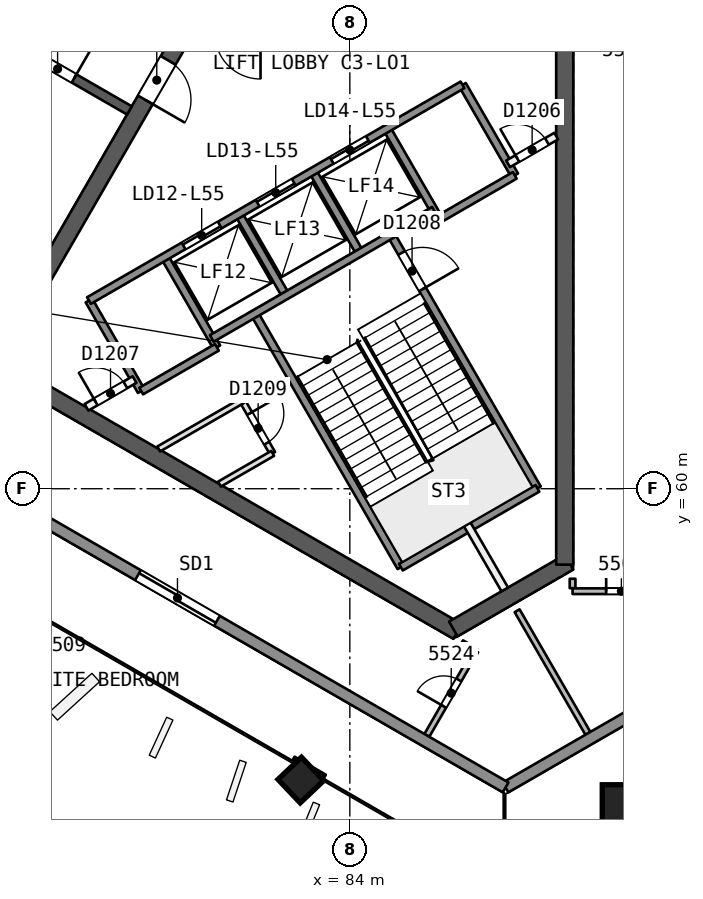
"""IFC4 building model, lengths in metres.
Left out: names, types, materials, properties, quantities, classifications, styles, units other than length and angle.
Written with IfcOpenShell. Run it as: python <this file> out.ifc"""

import sys

from ifc_helpers import new_model, si_unit, direction, frame, frame_2d, origin, origin_2d, place, context, subcontext, project, spatial, rectangle, extrude, element, fill, save


model = new_model("IFC4")
c1 = context("Model", 3, precision=1e-05, world=origin(), true_north=direction((0.0, 1.0)))
c2 = subcontext(c1, "Body", "Model", "MODEL_VIEW")
j1 = project(units=[si_unit("LENGTHUNIT", "METRE"), si_unit("PLANEANGLEUNIT", "RADIAN")], contexts=[c1])
p1 = place(None, origin())
s1 = spatial("IfcSite", under=j1, at=p1, CompositionType="ELEMENT")
p2 = place(p1, origin())
s2 = spatial("IfcBuilding", under=s1, at=p2, CompositionType="ELEMENT")
p3 = place(p2, frame((0.0, 0.0, 224.3)))
s3 = spatial("IfcBuildingStorey", under=s2, at=p3, CompositionType="ELEMENT", Elevation=224.3)
p4 = place(p3, frame((79.63, 71.981, 0.0), z_axis=(0.0, 0.0, 1.0), x_axis=(-0.500002171595, -0.86602415001, 0.0)))
e1 = element("IfcWall", 1, at=p4, inside=s3, PredefinedType="SHEAR", context=c2, shape_type="SweptSolid", body=[
    extrude(rectangle(XDim=10.25, YDim=0.45, at=frame_2d((5.125, 0.0))), origin(), (0.0, 0.0, 1.0), 3.7),
])
p5 = place(p4, frame((0.82, 0.0, 0.0)))
e2 = element("IfcOpeningElement", 2, at=p5, cuts=e1, PredefinedType="OPENING", context=c2, shape_type="SweptSolid", body=[
    extrude(rectangle(XDim=1.2, YDim=2.1, at=frame_2d((0.6, 1.05))), frame((0.0, 0.235, 0.0), z_axis=(0.0, -1.0, 0.0), x_axis=(1.0, 0.0, 0.0)), (0.0, 0.0, 1.0), 0.471),
])
p6 = place(p3, frame((74.617, 63.299, 0.0), z_axis=(0.0, 0.0, 1.0), x_axis=(0.86602594008, -0.499999071108, 0.0)))
e3 = element("IfcWall", 3, at=p6, inside=s3, PredefinedType="SHEAR", context=c2, shape_type="SweptSolid", body=[
    extrude(rectangle(XDim=14.108, YDim=0.45, at=frame_2d((7.054, 0.0))), origin(), (0.0, 0.0, 1.0), 3.7),
])
p7 = place(p3, frame((86.723, 56.31, 0.0), z_axis=(0.0, 0.0, 1.0), x_axis=(0.866042179588, 0.49997094233, 0.0)))
e4 = element("IfcWall", 4, at=p7, inside=s3, PredefinedType="SHEAR", context=c2, shape_type="SweptSolid", body=[
    extrude(rectangle(XDim=3.515, YDim=0.45, at=frame_2d((1.758, 0.0))), origin(), (0.0, 0.0, 1.0), 3.7),
])
p8 = place(p3, frame((89.655, 58.002, 0.0), z_axis=(0.0, 0.0, 1.0), x_axis=(0.0, 1.0, 0.0)))
e5 = element("IfcWall", 5, at=p8, inside=s3, PredefinedType="SHEAR", context=c2, shape_type="SweptSolid", body=[
    extrude(rectangle(XDim=14.204, YDim=0.45, at=frame_2d((7.102, 0.0))), origin(), (0.0, 0.0, 1.0), 3.7),
])
p9 = place(p3, frame((64.7, 77.748, 0.0), z_axis=(0.0, 0.0, 1.0), x_axis=(0.866026492143, -0.499998114903, 0.0)))
e6 = element("IfcWall", 6, at=p9, inside=s3, PredefinedType="SHEAR", context=c2, shape_type="SweptSolid", body=[
    extrude(rectangle(XDim=15.588, YDim=0.25, at=frame_2d((7.794, 0.0))), origin(), (0.0, 0.0, 1.0), 3.3),
])
p10 = place(p9, frame((2.462, 0.0, 0.0)))
e7 = element("IfcOpeningElement", 7, at=p10, cuts=e6, PredefinedType="OPENING", context=c2, shape_type="SweptSolid", body=[
    extrude(rectangle(XDim=1.0, YDim=2.1, at=frame_2d((0.5, 1.05))), frame((0.0, 0.135, 0.0), z_axis=(0.0, -1.0, 0.0), x_axis=(1.0, 0.0, 0.0)), (0.0, 0.0, 1.0), 0.271),
])
p11 = place(p9, frame((9.474, 0.0, 0.0)))
e8 = element("IfcOpeningElement", 8, at=p11, cuts=e6, PredefinedType="OPENING", context=c2, shape_type="SweptSolid", body=[
    extrude(rectangle(XDim=1.1, YDim=2.1, at=frame_2d((0.55, 1.05))), frame((0.0, 0.135, 0.0), z_axis=(0.0, -1.0, 0.0), x_axis=(1.0, 0.0, 0.0)), (0.0, 0.0, 1.0), 0.271),
])
p12 = place(p9, frame((12.906, 0.0, 0.0)))
e9 = element("IfcOpeningElement", 9, at=p12, cuts=e6, PredefinedType="OPENING", context=c2, shape_type="SweptSolid", body=[
    extrude(rectangle(XDim=1.0, YDim=2.1, at=frame_2d((0.5, 1.05))), frame((0.0, 0.135, 0.0), z_axis=(0.0, -1.0, 0.0), x_axis=(1.0, 0.0, 0.0)), (0.0, 0.0, 1.0), 0.271),
])
p13 = place(p3, frame((82.721, 52.301, 0.0), z_axis=(-0.008376454378, 0.028163354484, 0.999568237028), x_axis=(-0.500232049542, -0.86565577712, 0.020198320458)))
e10 = element("IfcColumn", 10, at=p13, inside=s3, PredefinedType="COLUMN", context=c2, shape_type="SweptSolid", body=[
    extrude(rectangle(XDim=0.85, YDim=0.85, at=origin_2d()), origin(), (0.0, 0.0, 1.0), 3.702),
])
p14 = place(p3, frame((91.613, 51.225, 0.0), z_axis=(-0.017541078386, 0.030532027415, 0.999379860649), x_axis=(0.497845433655, -0.866550650603, 0.035212130424)))
e11 = element("IfcColumn", 11, at=p14, inside=s3, PredefinedType="COLUMN", context=c2, shape_type="SweptSolid", body=[
    extrude(rectangle(XDim=1.9, YDim=1.9, at=origin_2d()), origin(), (0.0, 0.0, 1.0), 3.702),
])
p15 = place(p3, frame((89.861, 57.632, 0.0), z_axis=(0.0, 0.0, 1.0), x_axis=(0.0, -1.0, 0.0)))
e12 = element("IfcWall", 12, at=p15, inside=s3, PredefinedType="PARTITIONING", context=c2, shape_type="SweptSolid", body=[
    extrude(rectangle(XDim=0.248, YDim=0.15, at=frame_2d((0.124, 0.0))), origin(), (0.0, 0.0, 1.0), 3.3),
])
p16 = place(p3, frame((89.861, 57.304, 0.0), z_axis=(0.0, 0.0, 1.0), x_axis=(1.0, 0.0, 0.0)))
e13 = element("IfcWall", 13, at=p16, inside=s3, PredefinedType="PARTITIONING", context=c2, shape_type="SweptSolid", body=[
    extrude(rectangle(XDim=2.567, YDim=0.15, at=frame_2d((1.284, 0.0))), origin(), (0.0, 0.0, 1.0), 3.3),
])
p17 = place(p16, frame((0.884, 0.0, 0.0)))
e14 = element("IfcOpeningElement", 14, at=p17, cuts=e13, PredefinedType="OPENING", context=c2, shape_type="SweptSolid", body=[
    extrude(rectangle(XDim=0.8, YDim=2.1, at=frame_2d((0.4, 1.05))), frame((0.0, 0.085, 0.0), z_axis=(0.0, -1.0, 0.0), x_axis=(1.0, 0.0, 0.0)), (0.0, 0.0, 1.0), 0.171),
])
p18 = place(p3, frame((88.402, 56.789, 0.0), z_axis=(0.0, 0.0, 1.0), x_axis=(0.499966389646, -0.866044807862, 0.0)))
e15 = element("IfcWall", 15, at=p18, inside=s3, PredefinedType="PARTITIONING", context=c2, shape_type="SweptSolid", body=[
    extrude(rectangle(XDim=3.725, YDim=0.15, at=frame_2d((1.863, 0.0))), origin(), (0.0, 0.0, 1.0), 3.3),
])
p19 = place(p3, frame((86.026, 53.51, 0.0), z_axis=(0.0, 0.0, 1.0), x_axis=(0.50000507078, 0.866022476149, 0.0)))
e16 = element("IfcWall", 16, at=p19, inside=s3, PredefinedType="PARTITIONING", context=c2, shape_type="SweptSolid", body=[
    extrude(rectangle(XDim=2.567, YDim=0.15, at=frame_2d((1.284, 0.0))), origin(), (0.0, 0.0, 1.0), 3.3),
])
p20 = place(p19, frame((0.884, 0.0, 0.0)))
e17 = element("IfcOpeningElement", 17, at=p20, cuts=e16, PredefinedType="OPENING", context=c2, shape_type="SweptSolid", body=[
    extrude(rectangle(XDim=0.8, YDim=2.1, at=frame_2d((0.4, 1.05))), frame((0.0, 0.085, 0.0), z_axis=(0.0, -1.0, 0.0), x_axis=(1.0, 0.0, 0.0)), (0.0, 0.0, 1.0), 0.171),
])
p21 = place(p3, frame((87.31, 55.733, 0.0), z_axis=(0.0, 0.0, 1.0), x_axis=(-0.8659754619, 0.500086491905, 0.0)))
e18 = element("IfcWall", 18, at=p21, inside=s3, PredefinedType="PARTITIONING", context=c2, shape_type="SweptSolid", body=[
    extrude(rectangle(XDim=0.426, YDim=0.15, at=frame_2d((0.213, 0.0))), origin(), (0.0, 0.0, 1.0), 3.3),
])
p22 = place(p3, frame((92.577, 54.726, 0.0), z_axis=(0.0, 0.0, 1.0), x_axis=(-0.866032272612, -0.499988102653, 0.0)))
e19 = element("IfcWall", 19, at=p22, inside=s3, PredefinedType="SOLIDWALL", context=c2, shape_type="SweptSolid", body=[
    extrude(rectangle(XDim=5.171, YDim=0.3, at=frame_2d((2.585, 0.0))), origin(), (0.0, 0.0, 1.0), 3.3),
])
p23 = place(p3, frame((88.099, 52.141, 0.0), z_axis=(0.0, 0.0, 1.0), x_axis=(-0.86602584856, 0.499999229625, 0.0)))
e20 = element("IfcWall", 20, at=p23, inside=s3, PredefinedType="SOLIDWALL", context=c2, shape_type="SweptSolid", body=[
    extrude(rectangle(XDim=50.547, YDim=0.3, at=frame_2d((25.274, 0.0))), origin(), (0.0, 0.0, 1.0), 3.3),
])
p24 = place(p23, frame((23.294, 0.0, 0.0)))
e21 = element("IfcOpeningElement", 21, at=p24, cuts=e20, PredefinedType="OPENING", context=c2, shape_type="SweptSolid", body=[
    extrude(rectangle(XDim=2.4, YDim=2.4, at=frame_2d((1.2, 1.2))), frame((0.0, 0.161, 0.0), z_axis=(0.0, -1.0, 0.0), x_axis=(1.0, 0.0, 0.0)), (0.0, 0.0, 1.0), 0.321),
])
p25 = place(p23, frame((28.906, 0.0, 0.0)))
e22 = element("IfcOpeningElement", 22, at=p25, cuts=e20, PredefinedType="OPENING", context=c2, shape_type="SweptSolid", body=[
    extrude(rectangle(XDim=2.4, YDim=2.4, at=frame_2d((1.2, 1.2))), frame((0.0, 0.161, 0.0), z_axis=(0.0, -1.0, 0.0), x_axis=(1.0, 0.0, 0.0)), (0.0, 0.0, 1.0), 0.321),
])
p26 = place(p23, frame((39.328, 0.0, 0.0)))
e23 = element("IfcOpeningElement", 23, at=p26, cuts=e20, PredefinedType="OPENING", context=c2, shape_type="SweptSolid", body=[
    extrude(rectangle(XDim=2.4, YDim=2.4, at=frame_2d((1.2, 1.2))), frame((0.0, 0.161, 0.0), z_axis=(0.0, -1.0, 0.0), x_axis=(1.0, 0.0, 0.0)), (0.0, 0.0, 1.0), 0.321),
])
p27 = place(p23, frame((18.462, 0.0, 0.0)))
e24 = element("IfcOpeningElement", 24, at=p27, cuts=e20, PredefinedType="OPENING", context=c2, shape_type="SweptSolid", body=[
    extrude(rectangle(XDim=2.4, YDim=2.4, at=frame_2d((1.2, 1.2))), frame((0.0, 0.161, 0.0), z_axis=(0.0, -1.0, 0.0), x_axis=(1.0, 0.0, 0.0)), (0.0, 0.0, 1.0), 0.321),
])
p28 = place(p23, frame((8.771, 0.0, 0.0)))
e25 = element("IfcOpeningElement", 25, at=p28, cuts=e20, PredefinedType="OPENING", context=c2, shape_type="SweptSolid", body=[
    extrude(rectangle(XDim=2.4, YDim=2.4, at=frame_2d((1.2, 1.2))), frame((0.0, 0.161, 0.0), z_axis=(0.0, -1.0, 0.0), x_axis=(1.0, 0.0, 0.0)), (0.0, 0.0, 1.0), 0.321),
])
p29 = place(p3, frame((77.135, 64.952, 0.0), z_axis=(0.0, 0.0, 1.0), x_axis=(0.499996545922, -0.866027397988, 0.0)))
e26 = element("IfcWall", 26, at=p29, inside=s3, PredefinedType="SOLIDWALL", context=c2, shape_type="SweptSolid", body=[
    extrude(rectangle(XDim=2.75, YDim=0.2, at=frame_2d((1.375, 0.0))), origin(), (0.0, 0.0, 1.0), 3.3),
])
p30 = place(p3, frame((81.169, 62.315, 0.0), z_axis=(0.0, 0.0, 1.0), x_axis=(0.499995408039, -0.866028054938, 0.0)))
e27 = element("IfcWall", 27, at=p30, inside=s3, PredefinedType="PARTITIONING", context=c2, shape_type="SweptSolid", body=[
    extrude(rectangle(XDim=1.6, YDim=0.15, at=frame_2d((0.8, 0.0))), origin(), (0.0, 0.0, 1.0), 3.3),
])
p31 = place(p30, frame((0.387, 0.0, 0.0)))
e28 = element("IfcOpeningElement", 28, at=p31, cuts=e27, PredefinedType="OPENING", context=c2, shape_type="SweptSolid", body=[
    extrude(rectangle(XDim=0.9, YDim=2.1, at=frame_2d((0.45, 1.05))), frame((0.0, 0.085, 0.0), z_axis=(0.0, -1.0, 0.0), x_axis=(1.0, 0.0, 0.0)), (0.0, 0.0, 1.0), 0.171),
])
p32 = place(p3, frame((79.127, 66.102, 0.0), z_axis=(0.0, 0.0, 1.0), x_axis=(0.499996545922, -0.866027397988, 0.0)))
e29 = element("IfcWall", 29, at=p32, inside=s3, PredefinedType="SOLIDWALL", context=c2, shape_type="SweptSolid", body=[
    extrude(rectangle(XDim=2.75, YDim=0.2, at=frame_2d((1.375, 0.0))), origin(), (0.0, 0.0, 1.0), 3.3),
])
p33 = place(p3, frame((81.493, 64.604, 0.0), z_axis=(0.0, 0.0, 1.0), x_axis=(0.500006057782, -0.866021906294, 0.0)))
e30 = element("IfcWall", 30, at=p33, inside=s3, PredefinedType="SOLIDWALL", context=c2, shape_type="SweptSolid", body=[
    extrude(rectangle(XDim=7.7, YDim=0.2, at=frame_2d((3.85, 0.0))), origin(), (0.0, 0.0, 1.0), 3.3),
])
p34 = place(p3, frame((81.076, 67.227, 0.0), z_axis=(0.0, 0.0, 1.0), x_axis=(0.50000366821, -0.866023285932, 0.0)))
e31 = element("IfcWall", 31, at=p34, inside=s3, PredefinedType="SOLIDWALL", context=c2, shape_type="SweptSolid", body=[
    extrude(rectangle(XDim=2.48, YDim=0.2, at=frame_2d((1.24, 0.0))), origin(), (0.0, 0.0, 1.0), 3.3),
])
p35 = place(p3, frame((87.09, 59.06, 0.0), z_axis=(0.0, 0.0, 1.0), x_axis=(0.500011643316, -0.866018681408, 0.0)))
e32 = element("IfcWall", 32, at=p35, inside=s3, PredefinedType="PARTITIONING", context=c2, shape_type="SweptSolid", body=[
    extrude(rectangle(XDim=1.973, YDim=0.2, at=frame_2d((0.987, 0.0))), origin(), (0.0, 0.0, 1.0), 3.3),
])
p36 = place(p3, frame((83.024, 68.352, 0.0), z_axis=(0.0, 0.0, 1.0), x_axis=(0.50000366821, -0.866023285932, 0.0)))
e33 = element("IfcWall", 33, at=p36, inside=s3, PredefinedType="SOLIDWALL", context=c2, shape_type="SweptSolid", body=[
    extrude(rectangle(XDim=2.48, YDim=0.2, at=frame_2d((1.24, 0.0))), origin(), (0.0, 0.0, 1.0), 3.3),
])
p37 = place(p3, frame((85.087, 66.679, 0.0), z_axis=(0.0, 0.0, 1.0), x_axis=(0.500019787375, -0.866013979237, 0.0)))
e34 = element("IfcWall", 34, at=p37, inside=s3, PredefinedType="SOLIDWALL", context=c2, shape_type="SweptSolid", body=[
    extrude(rectangle(XDim=7.7, YDim=0.2, at=frame_2d((3.85, 0.0))), origin(), (0.0, 0.0, 1.0), 3.3),
])
p38 = place(p37, frame((0.55, 0.0, 0.0)))
e35 = element("IfcOpeningElement", 35, at=p38, cuts=e34, PredefinedType="OPENING", context=c2, shape_type="SweptSolid", body=[
    extrude(rectangle(XDim=1.1, YDim=2.1, at=frame_2d((0.55, 1.05))), frame((0.0, 0.11, 0.0), z_axis=(0.0, -1.0, 0.0), x_axis=(1.0, 0.0, 0.0)), (0.0, 0.0, 1.0), 0.221),
])
for number, where, z_axis, x_axis in (
    (36, (84.973, 69.477, 0.0), (0.0, 0.0, 1.0), (0.5, -0.866, 0.0)),
    (37, (86.965, 70.626, 0.0), (0.0, 0.0, 1.0), (0.5, -0.866, 0.0)),
):
    element("IfcWall", number, at=place(p3, frame(where, z_axis=z_axis, x_axis=x_axis)), inside=s3, PredefinedType="SOLIDWALL", context=c2, shape_type="SweptSolid", body=[
        extrude(rectangle(XDim=2.75, YDim=0.2, at=frame_2d((1.375, 0.0))), origin(), (0.0, 0.0, 1.0), 3.3),
    ])
p39 = place(p3, frame((77.135, 64.952, 0.0), z_axis=(0.0, 0.0, 1.0), x_axis=(0.866031916153, 0.499988720078, 0.0)))
e38 = element("IfcWall", 38, at=p39, inside=s3, PredefinedType="SOLIDWALL", context=c2, shape_type="SweptSolid", body=[
    extrude(rectangle(XDim=11.35, YDim=0.2, at=frame_2d((5.675, 0.0))), origin(), (0.0, 0.0, 1.0), 3.3),
])
p40 = place(p39, frame((2.875, 0.0, 0.0)))
e39 = element("IfcOpeningElement", 39, at=p40, cuts=e38, PredefinedType="OPENING", context=c2, shape_type="SweptSolid", body=[
    extrude(rectangle(XDim=1.1, YDim=2.1, at=frame_2d((0.55, 1.05))), frame((0.0, 0.11, 0.0), z_axis=(0.0, -1.0, 0.0), x_axis=(1.0, 0.0, 0.0)), (0.0, 0.0, 1.0), 0.221),
])
p41 = place(p39, frame((5.125, 0.0, 0.0)))
e40 = element("IfcOpeningElement", 40, at=p41, cuts=e38, PredefinedType="OPENING", context=c2, shape_type="SweptSolid", body=[
    extrude(rectangle(XDim=1.1, YDim=2.1, at=frame_2d((0.55, 1.05))), frame((0.0, 0.11, 0.0), z_axis=(0.0, -1.0, 0.0), x_axis=(1.0, 0.0, 0.0)), (0.0, 0.0, 1.0), 0.221),
])
p42 = place(p39, frame((7.375, 0.0, 0.0)))
e41 = element("IfcOpeningElement", 41, at=p42, cuts=e38, PredefinedType="OPENING", context=c2, shape_type="SweptSolid", body=[
    extrude(rectangle(XDim=1.1, YDim=2.1, at=frame_2d((0.55, 1.05))), frame((0.0, 0.11, 0.0), z_axis=(0.0, -1.0, 0.0), x_axis=(1.0, 0.0, 0.0)), (0.0, 0.0, 1.0), 0.221),
])
p43 = place(p3, frame((77.07, 62.143, 0.0), z_axis=(0.0, 0.0, 1.0), x_axis=(0.866013036001, 0.500021421018, 0.0)))
e42 = element("IfcWall", 42, at=p43, inside=s3, PredefinedType="PARTITIONING", context=c2, shape_type="SweptSolid", body=[
    extrude(rectangle(XDim=1.461, YDim=0.2, at=frame_2d((0.73, 0.0))), origin(), (0.0, 0.0, 1.0), 3.3),
])
p44 = place(p43, frame((0.281, 0.0, 0.0)))
e43 = element("IfcOpeningElement", 43, at=p44, cuts=e42, PredefinedType="OPENING", context=c2, shape_type="SweptSolid", body=[
    extrude(rectangle(XDim=0.9, YDim=2.1, at=frame_2d((0.45, 1.05))), frame((0.0, 0.11, 0.0), z_axis=(0.0, -1.0, 0.0), x_axis=(1.0, 0.0, 0.0)), (0.0, 0.0, 1.0), 0.221),
])
p45 = place(p3, frame((88.165, 68.548, 0.0), z_axis=(0.0, 0.0, 1.0), x_axis=(0.866013036001, 0.500021421018, 0.0)))
e44 = element("IfcWall", 44, at=p45, inside=s3, PredefinedType="PARTITIONING", context=c2, shape_type="SweptSolid", body=[
    extrude(rectangle(XDim=1.461, YDim=0.2, at=frame_2d((0.73, 0.0))), origin(), (0.0, 0.0, 1.0), 3.3),
])
p46 = place(p45, frame((0.281, 0.0, 0.0)))
e45 = element("IfcOpeningElement", 45, at=p46, cuts=e44, PredefinedType="OPENING", context=c2, shape_type="SweptSolid", body=[
    extrude(rectangle(XDim=0.9, YDim=2.1, at=frame_2d((0.45, 1.05))), frame((0.0, 0.11, 0.0), z_axis=(0.0, -1.0, 0.0), x_axis=(1.0, 0.0, 0.0)), (0.0, 0.0, 1.0), 0.221),
])
p47 = place(p3, frame((80.367, 63.954, 0.0), z_axis=(0.0, 0.0, 1.0), x_axis=(0.866026575979, 0.499997969693, 0.0)))
e46 = element("IfcWall", 46, at=p47, inside=s3, PredefinedType="SOLIDWALL", context=c2, shape_type="SweptSolid", body=[
    extrude(rectangle(XDim=6.75, YDim=0.2, at=frame_2d((3.375, 0.0))), origin(), (0.0, 0.0, 1.0), 3.3),
])
p48 = place(p3, frame((78.51, 62.57, 0.0), z_axis=(0.0, 0.0, 1.0), x_axis=(0.866053019151, 0.499952165731, 0.0)))
e47 = element("IfcWall", 47, at=p48, inside=s3, PredefinedType="SOLIDWALL", context=c2, shape_type="SweptSolid", body=[
    extrude(rectangle(XDim=2.3, YDim=0.2, at=frame_2d((1.15, 0.0))), origin(), (0.0, 0.0, 1.0), 3.3),
])
p49 = place(p3, frame((86.348, 67.095, 0.0), z_axis=(0.0, 0.0, 1.0), x_axis=(0.86602648383, 0.499998129301, 0.0)))
e48 = element("IfcWall", 48, at=p49, inside=s3, PredefinedType="SOLIDWALL", context=c2, shape_type="SweptSolid", body=[
    extrude(rectangle(XDim=2.3, YDim=0.2, at=frame_2d((1.15, 0.0))), origin(), (0.0, 0.0, 1.0), 3.3),
])
p50 = place(p3, frame((78.97, 61.046, 0.0), z_axis=(0.0, 0.0, 1.0), x_axis=(0.866033475577, 0.499986018985, 0.0)))
e49 = element("IfcWall", 49, at=p50, inside=s3, PredefinedType="PARTITIONING", context=c2, shape_type="SweptSolid", body=[
    extrude(rectangle(XDim=2.539, YDim=0.15, at=frame_2d((1.27, 0.0))), origin(), (0.0, 0.0, 1.0), 3.3),
])
p51 = place(p3, frame((80.57, 60.122, 0.0), z_axis=(0.0, 0.0, 1.0), x_axis=(0.866039608017, 0.49997539674, 0.0)))
e50 = element("IfcWall", 50, at=p51, inside=s3, PredefinedType="PARTITIONING", context=c2, shape_type="SweptSolid", body=[
    extrude(rectangle(XDim=1.615, YDim=0.15, at=frame_2d((0.808, 0.0))), origin(), (0.0, 0.0, 1.0), 3.3),
])
p52 = place(p3, frame((85.343, 57.935, 0.0), z_axis=(0.0, 0.0, 1.0), x_axis=(0.866004344652, 0.500036473714, 0.0)))
e51 = element("IfcWall", 51, at=p52, inside=s3, PredefinedType="SOLIDWALL", context=c2, shape_type="SweptSolid", body=[
    extrude(rectangle(XDim=4.15, YDim=0.2, at=frame_2d((2.075, 0.0))), origin(), (0.0, 0.0, 1.0), 3.3),
])
p53 = place(p17, origin())
e52 = element("IfcDoor", 52, at=p53, inside=s3, OperationType="SINGLE_SWING_LEFT", PredefinedType="NOTDEFINED", context=c2, shape_type="SweptSolid", body=[
    extrude(rectangle(XDim=0.8, YDim=2.1, at=frame_2d((0.4, 1.05))), frame((0.0, 0.025, 0.0), z_axis=(0.0, -1.0, 0.0), x_axis=(1.0, 0.0, 0.0)), (0.0, 0.0, 1.0), 0.05),
])
fill(e14, e52)
p54 = place(p12, origin())
e53 = element("IfcDoor", 53, at=p54, inside=s3, OperationType="SINGLE_SWING_RIGHT", PredefinedType="NOTDEFINED", context=c2, shape_type="SweptSolid", body=[
    extrude(rectangle(XDim=1.0, YDim=2.1, at=frame_2d((0.5, 1.05))), frame((0.0, 0.025, 0.0), z_axis=(0.0, -1.0, 0.0), x_axis=(1.0, 0.0, 0.0)), (0.0, 0.0, 1.0), 0.05),
])
fill(e9, e53)
p55 = place(p20, origin())
e54 = element("IfcDoor", 54, at=p55, inside=s3, OperationType="SINGLE_SWING_LEFT", PredefinedType="NOTDEFINED", context=c2, shape_type="SweptSolid", body=[
    extrude(rectangle(XDim=0.8, YDim=2.1, at=frame_2d((0.4, 1.05))), frame((0.0, 0.025, 0.0), z_axis=(0.0, -1.0, 0.0), x_axis=(1.0, 0.0, 0.0)), (0.0, 0.0, 1.0), 0.05),
])
fill(e17, e54)
p56 = place(p28, origin())
e55 = element("IfcDoor", 55, at=p56, inside=s3, OperationType="SLIDING_TO_LEFT", PredefinedType="NOTDEFINED", context=c2, shape_type="SweptSolid", body=[
    extrude(rectangle(XDim=2.4, YDim=2.4, at=frame_2d((1.2, 1.2))), frame((0.0, 0.025, 0.0), z_axis=(0.0, -1.0, 0.0), x_axis=(1.0, 0.0, 0.0)), (0.0, 0.0, 1.0), 0.05),
])
fill(e25, e55)
p57 = place(p5, origin())
e56 = element("IfcDoor", 56, at=p57, inside=s3, OperationType="SINGLE_SWING_RIGHT", PredefinedType="NOTDEFINED", context=c2, shape_type="SweptSolid", body=[
    extrude(rectangle(XDim=1.2, YDim=2.1, at=frame_2d((0.6, 1.05))), frame((0.0, 0.025, 0.0), z_axis=(0.0, -1.0, 0.0), x_axis=(1.0, 0.0, 0.0)), (0.0, 0.0, 1.0), 0.05),
])
fill(e2, e56)
p58 = place(p40, origin())
e57 = element("IfcDoor", 57, at=p58, inside=s3, OperationType="SLIDING_TO_LEFT", PredefinedType="NOTDEFINED", context=c2, shape_type="SweptSolid", body=[
    extrude(rectangle(XDim=1.1, YDim=2.1, at=frame_2d((0.55, 1.05))), frame((0.0, 0.025, 0.0), z_axis=(0.0, -1.0, 0.0), x_axis=(1.0, 0.0, 0.0)), (0.0, 0.0, 1.0), 0.05),
])
fill(e39, e57)
p59 = place(p41, origin())
e58 = element("IfcDoor", 58, at=p59, inside=s3, OperationType="SLIDING_TO_RIGHT", PredefinedType="NOTDEFINED", context=c2, shape_type="SweptSolid", body=[
    extrude(rectangle(XDim=1.1, YDim=2.1, at=frame_2d((0.55, 1.05))), frame((0.0, 0.025, 0.0), z_axis=(0.0, -1.0, 0.0), x_axis=(1.0, 0.0, 0.0)), (0.0, 0.0, 1.0), 0.05),
])
fill(e40, e58)
p60 = place(p42, origin())
e59 = element("IfcDoor", 59, at=p60, inside=s3, OperationType="SLIDING_TO_LEFT", PredefinedType="NOTDEFINED", context=c2, shape_type="SweptSolid", body=[
    extrude(rectangle(XDim=1.1, YDim=2.1, at=frame_2d((0.55, 1.05))), frame((0.0, 0.025, 0.0), z_axis=(0.0, -1.0, 0.0), x_axis=(1.0, 0.0, 0.0)), (0.0, 0.0, 1.0), 0.05),
])
fill(e41, e59)
p61 = place(p46, origin())
e60 = element("IfcDoor", 60, at=p61, inside=s3, OperationType="SINGLE_SWING_LEFT", PredefinedType="NOTDEFINED", context=c2, shape_type="SweptSolid", body=[
    extrude(rectangle(XDim=0.9, YDim=2.1, at=frame_2d((0.45, 1.05))), frame((0.0, 0.025, 0.0), z_axis=(0.0, -1.0, 0.0), x_axis=(1.0, 0.0, 0.0)), (0.0, 0.0, 1.0), 0.05),
])
fill(e45, e60)
p62 = place(p44, origin())
e61 = element("IfcDoor", 61, at=p62, inside=s3, OperationType="SINGLE_SWING_LEFT", PredefinedType="NOTDEFINED", context=c2, shape_type="SweptSolid", body=[
    extrude(rectangle(XDim=0.9, YDim=2.1, at=frame_2d((0.45, 1.05))), frame((0.0, 0.025, 0.0), z_axis=(0.0, -1.0, 0.0), x_axis=(1.0, 0.0, 0.0)), (0.0, 0.0, 1.0), 0.05),
])
fill(e43, e61)
p63 = place(p38, origin())
e62 = element("IfcDoor", 62, at=p63, inside=s3, OperationType="SINGLE_SWING_RIGHT", PredefinedType="NOTDEFINED", context=c2, shape_type="SweptSolid", body=[
    extrude(rectangle(XDim=1.1, YDim=2.1, at=frame_2d((0.55, 1.05))), frame((0.0, 0.025, 0.0), z_axis=(0.0, -1.0, 0.0), x_axis=(1.0, 0.0, 0.0)), (0.0, 0.0, 1.0), 0.05),
])
fill(e35, e62)
p64 = place(p31, origin())
e63 = element("IfcDoor", 63, at=p64, inside=s3, OperationType="SINGLE_SWING_LEFT", PredefinedType="NOTDEFINED", context=c2, shape_type="SweptSolid", body=[
    extrude(rectangle(XDim=0.9, YDim=2.1, at=frame_2d((0.45, 1.05))), frame((0.0, 0.025, 0.0), z_axis=(0.0, -1.0, 0.0), x_axis=(1.0, 0.0, 0.0)), (0.0, 0.0, 1.0), 0.05),
])
fill(e28, e63)
save(model, sys.argv[1])
